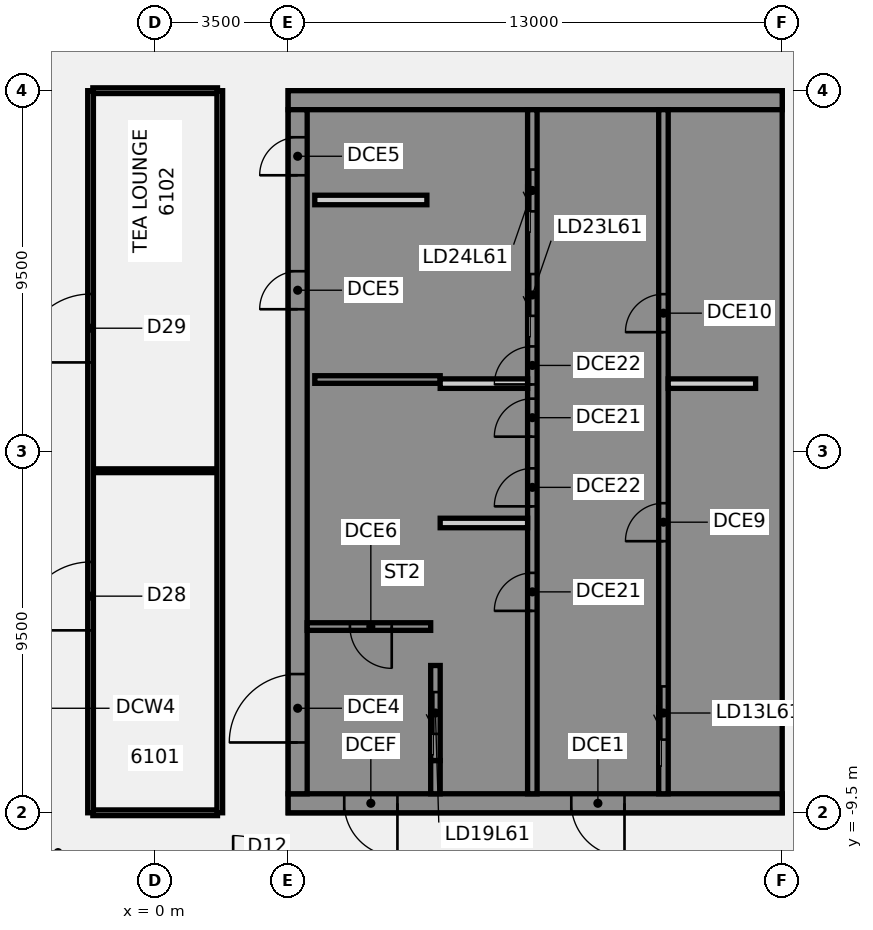
"""IFC4 building model, lengths in metres.
Left out: names, types, materials, properties, quantities, classifications, styles, units other than length and angle.
Written with IfcOpenShell. Run it as: python <this file> out.ifc"""

import sys

from ifc_helpers import new_model, si_unit, direction, frame, frame_2d, origin, place, context, subcontext, project, spatial, polyline, rectangle, outline, extrude, element, fill, save


model = new_model("IFC4")
c1 = context("Model", 3, precision=1e-05, world=origin(), true_north=direction((0.0, 1.0)))
c2 = subcontext(c1, "Body", "Model", "MODEL_VIEW")
j1 = project(units=[si_unit("LENGTHUNIT", "METRE"), si_unit("PLANEANGLEUNIT", "RADIAN")], contexts=[c1])
p1 = place(None, origin())
s1 = spatial("IfcSite", under=j1, at=p1, CompositionType="ELEMENT")
p2 = place(p1, origin())
s2 = spatial("IfcBuilding", under=s1, at=p2, CompositionType="ELEMENT")
p3 = place(p2, frame((0.0, 0.0, 241.5)))
s3 = spatial("IfcBuildingStorey", under=s2, at=p3, CompositionType="ELEMENT", Elevation=241.5)
p4 = place(p3, frame((-1.64, -9.5, 0.0), z_axis=(0.0, 0.0, 1.0), x_axis=(1.0, 0.0, 0.0)))
e1 = element("IfcWall", 1, at=p4, inside=s3, PredefinedType="PARTITIONING", context=c2, shape_type="SweptSolid", body=[
    extrude(rectangle(XDim=3.28, YDim=0.15, at=frame_2d((1.64, 0.0))), origin(), (0.0, 0.0, 1.0), 2.864),
])
p5 = place(p3, frame((-1.64, -0.5, 0.0), z_axis=(0.0, 0.0, 1.0), x_axis=(1.0, 0.0, 0.0)))
e2 = element("IfcWall", 2, at=p5, inside=s3, PredefinedType="PARTITIONING", context=c2, shape_type="SweptSolid", body=[
    extrude(rectangle(XDim=3.28, YDim=0.1, at=frame_2d((1.64, 0.0))), origin(), (0.0, 0.0, 1.0), 2.864),
])
p6 = place(p3, frame((-1.64, 9.5, 0.0), z_axis=(0.0, 0.0, 1.0), x_axis=(1.0, 0.0, 0.0)))
e3 = element("IfcWall", 3, at=p6, inside=s3, PredefinedType="PARTITIONING", context=c2, shape_type="SweptSolid", body=[
    extrude(rectangle(XDim=3.28, YDim=0.15, at=frame_2d((1.64, 0.0))), origin(), (0.0, 0.0, 1.0), 2.864),
])
p7 = place(p3, frame((-1.7, -9.5, 0.0), z_axis=(0.0, 0.0, 1.0), x_axis=(0.0, 1.0, 0.0)))
e4 = element("IfcWall", 4, at=p7, inside=s3, PredefinedType="PARTITIONING", context=c2, shape_type="SweptSolid", body=[
    extrude(rectangle(XDim=19.0, YDim=0.15, at=frame_2d((9.5, 0.0))), origin(), (0.0, 0.0, 1.0), 2.864),
])
p8 = place(p7, frame((4.8, 0.0, 0.0)))
e5 = element("IfcOpeningElement", 5, at=p8, cuts=e4, PredefinedType="OPENING", context=c2, shape_type="SweptSolid", body=[
    extrude(rectangle(XDim=1.8, YDim=2.1, at=frame_2d((0.9, 1.05))), frame((0.0, 0.085, 0.0), z_axis=(0.0, -1.0, 0.0), x_axis=(1.0, 0.0, 0.0)), (0.0, 0.0, 1.0), 0.17),
])
p9 = place(p7, frame((11.85, 0.0, 0.0)))
e6 = element("IfcOpeningElement", 6, at=p9, cuts=e4, PredefinedType="OPENING", context=c2, shape_type="SweptSolid", body=[
    extrude(rectangle(XDim=1.8, YDim=2.1, at=frame_2d((0.9, 1.05))), frame((0.0, 0.085, 0.0), z_axis=(0.0, -1.0, 0.0), x_axis=(1.0, 0.0, 0.0)), (0.0, 0.0, 1.0), 0.17),
])
p10 = place(p3, frame((1.7, -9.5, 0.0), z_axis=(0.0, 0.0, 1.0), x_axis=(0.0, 1.0, 0.0)))
e7 = element("IfcWall", 7, at=p10, inside=s3, PredefinedType="PARTITIONING", context=c2, shape_type="SweptSolid", body=[
    extrude(rectangle(XDim=19.0, YDim=0.15, at=frame_2d((9.5, 0.0))), origin(), (0.0, 0.0, 1.0), 2.864),
])
p11 = place(p3, frame((16.5, -9.25, 0.0), z_axis=(0.0, 0.0, 1.0), x_axis=(-1.0, 0.0, 0.0)))
e8 = element("IfcWall", 8, at=p11, inside=s3, PredefinedType="SHEAR", context=c2, shape_type="SweptSolid", body=[
    extrude(rectangle(XDim=13.0, YDim=0.5, at=frame_2d((6.5, 0.0))), origin(), (0.0, 0.0, 1.0), 3.46),
])
p12 = place(p11, frame((4.15, 0.0, 0.0)))
e9 = element("IfcOpeningElement", 9, at=p12, cuts=e8, PredefinedType="OPENING", context=c2, shape_type="SweptSolid", body=[
    extrude(rectangle(XDim=1.4, YDim=2.1, at=frame_2d((0.7, 1.05))), frame((0.0, 0.26, 0.0), z_axis=(0.0, -1.0, 0.0), x_axis=(1.0, 0.0, 0.0)), (0.0, 0.0, 1.0), 0.52),
])
p13 = place(p11, frame((10.125, 0.0, 0.0)))
e10 = element("IfcOpeningElement", 10, at=p13, cuts=e8, PredefinedType="OPENING", context=c2, shape_type="SweptSolid", body=[
    extrude(rectangle(XDim=1.4, YDim=2.1, at=frame_2d((0.7, 1.05))), frame((0.0, 0.26, 0.0), z_axis=(0.0, -1.0, 0.0), x_axis=(1.0, 0.0, 0.0)), (0.0, 0.0, 1.0), 0.52),
])
p14 = place(p3, origin())
e11 = element("IfcWall", 11, at=p14, inside=s3, PredefinedType="SHEAR", context=c2, shape_type="SweptSolid", body=[
    extrude(outline(polyline([(13.5, -8.125), (13.5, -9.0), (16.0, -9.0), (16.5, -9.0), (16.5, 9.0), (16.0, 9.0), (13.5, 9.0), (13.5, 8.125), (16.0, 8.125), (16.0, 5.625), (13.5, 5.625), (13.5, 5.375), (16.0, 5.375), (16.0, -5.375), (13.5, -5.375), (13.5, -5.625), (16.0, -5.625), (16.0, -8.125), (13.5, -8.125)])), origin(), (0.0, 0.0, 1.0), 3.46),
])
p15 = place(p3, frame((16.5, 9.25, 0.0), z_axis=(0.0, 0.0, 1.0), x_axis=(-1.0, 0.0, 0.0)))
e12 = element("IfcWall", 12, at=p15, inside=s3, PredefinedType="SHEAR", context=c2, shape_type="SweptSolid", body=[
    extrude(rectangle(XDim=13.0, YDim=0.5, at=frame_2d((6.5, 0.0))), origin(), (0.0, 0.0, 1.0), 3.46),
])
p16 = place(p3, origin())
e13 = element("IfcWall", 13, at=p16, inside=s3, PredefinedType="SHEAR", context=c2, shape_type="SweptSolid", body=[
    extrude(outline(polyline([(9.8, -5.375), (7.5, -5.375), (7.5, 2.625), (9.8, 2.625), (9.8, 2.875), (7.5, 2.875), (7.5, 5.375), (9.8, 5.375), (9.8, 5.625), (7.5, 5.625), (7.5, 8.125), (9.8, 8.125), (9.8, 9.0), (7.5, 9.0), (7.25, 9.0), (7.25, -5.625), (7.5, -5.625), (9.8, -5.625), (9.8, -5.375)])), origin(), (0.0, 0.0, 1.0), 3.46),
])
p17 = place(p3, origin())
e14 = element("IfcWall", 14, at=p17, inside=s3, PredefinedType="SHEAR", context=c2, shape_type="SweptSolid", body=[
    extrude(outline(polyline([(7.5, -8.125), (7.5, -9.0), (9.8, -9.0), (9.8, -8.125), (9.8, -5.625), (9.55, -5.625), (9.55, -8.125), (7.5, -8.125)])), origin(), (0.0, 0.0, 1.0), 3.46),
])
p18 = place(p3, frame((7.375, -9.0, 0.0), z_axis=(0.0, 0.0, 1.0), x_axis=(0.0, 1.0, 0.0)))
e15 = element("IfcWall", 15, at=p18, inside=s3, PredefinedType="SHEAR", context=c2, shape_type="SweptSolid", body=[
    extrude(rectangle(XDim=0.875, YDim=0.25, at=frame_2d((0.438, 0.0))), origin(), (0.0, 0.0, 1.0), 3.46),
])
p19 = place(p3, frame((7.5, 1.9, 0.0), z_axis=(0.0, 0.0, 1.0), x_axis=(-1.0, 0.0, 0.0)))
e16 = element("IfcWall", 16, at=p19, inside=s3, PredefinedType="SHEAR", context=c2, shape_type="SweptSolid", body=[
    extrude(rectangle(XDim=3.3, YDim=0.2, at=frame_2d((1.65, 0.0))), origin(), (0.0, 0.0, 1.0), 3.46),
])
p20 = place(p3, frame((13.375, -9.0, 0.0), z_axis=(0.0, 0.0, 1.0), x_axis=(0.0, 1.0, 0.0)))
e17 = element("IfcWall", 17, at=p20, inside=s3, PredefinedType="SHEAR", context=c2, shape_type="SweptSolid", body=[
    extrude(rectangle(XDim=18.0, YDim=0.25, at=frame_2d((9.0, 0.0))), origin(), (0.0, 0.0, 1.0), 3.46),
])
p21 = place(p20, frame((1.425, 0.0, 0.0)))
e18 = element("IfcOpeningElement", 18, at=p21, cuts=e17, PredefinedType="OPENING", context=c2, shape_type="SweptSolid", body=[
    extrude(rectangle(XDim=1.4, YDim=2.1, at=frame_2d((0.7, 1.05))), frame((0.0, 0.135, 0.0), z_axis=(0.0, -1.0, 0.0), x_axis=(1.0, 0.0, 0.0)), (0.0, 0.0, 1.0), 0.27),
])
p22 = place(p20, frame((6.646, 0.0, 0.0)))
e19 = element("IfcOpeningElement", 19, at=p22, cuts=e17, PredefinedType="OPENING", context=c2, shape_type="SweptSolid", body=[
    extrude(rectangle(XDim=1.0, YDim=2.1, at=frame_2d((0.5, 1.05))), frame((0.0, 0.135, 0.0), z_axis=(0.0, -1.0, 0.0), x_axis=(1.0, 0.0, 0.0)), (0.0, 0.0, 1.0), 0.27),
])
p23 = place(p20, frame((12.146, 0.0, 0.0)))
e20 = element("IfcOpeningElement", 20, at=p23, cuts=e17, PredefinedType="OPENING", context=c2, shape_type="SweptSolid", body=[
    extrude(rectangle(XDim=1.0, YDim=2.1, at=frame_2d((0.5, 1.05))), frame((0.0, 0.135, 0.0), z_axis=(0.0, -1.0, 0.0), x_axis=(1.0, 0.0, 0.0)), (0.0, 0.0, 1.0), 0.27),
])
p24 = place(p3, frame((9.925, -9.0, 0.0), z_axis=(0.0, 0.0, 1.0), x_axis=(0.0, 1.0, 0.0)))
e21 = element("IfcWall", 21, at=p24, inside=s3, PredefinedType="SHEAR", context=c2, shape_type="SweptSolid", body=[
    extrude(rectangle(XDim=18.0, YDim=0.25, at=frame_2d((9.0, 0.0))), origin(), (0.0, 0.0, 1.0), 3.46),
])
p25 = place(p24, frame((12.575, 0.0, 0.0)))
e22 = element("IfcOpeningElement", 22, at=p25, cuts=e21, PredefinedType="OPENING", context=c2, shape_type="SweptSolid", body=[
    extrude(rectangle(XDim=1.1, YDim=2.1, at=frame_2d((0.55, 1.05))), frame((0.0, 0.135, 0.0), z_axis=(0.0, -1.0, 0.0), x_axis=(1.0, 0.0, 0.0)), (0.0, 0.0, 1.0), 0.27),
])
p26 = place(p24, frame((15.325, 0.0, 0.0)))
e23 = element("IfcOpeningElement", 23, at=p26, cuts=e21, PredefinedType="OPENING", context=c2, shape_type="SweptSolid", body=[
    extrude(rectangle(XDim=1.1, YDim=2.1, at=frame_2d((0.55, 1.05))), frame((0.0, 0.135, 0.0), z_axis=(0.0, -1.0, 0.0), x_axis=(1.0, 0.0, 0.0)), (0.0, 0.0, 1.0), 0.27),
])
p27 = place(p24, frame((4.812, 0.0, 0.0)))
e24 = element("IfcOpeningElement", 24, at=p27, cuts=e21, PredefinedType="OPENING", context=c2, shape_type="SweptSolid", body=[
    extrude(rectangle(XDim=1.0, YDim=2.1, at=frame_2d((0.5, 1.05))), frame((0.0, 0.135, 0.0), z_axis=(0.0, -1.0, 0.0), x_axis=(1.0, 0.0, 0.0)), (0.0, 0.0, 1.0), 0.27),
])
p28 = place(p24, frame((7.562, 0.0, 0.0)))
e25 = element("IfcOpeningElement", 25, at=p28, cuts=e21, PredefinedType="OPENING", context=c2, shape_type="SweptSolid", body=[
    extrude(rectangle(XDim=1.0, YDim=2.1, at=frame_2d((0.5, 1.05))), frame((0.0, 0.135, 0.0), z_axis=(0.0, -1.0, 0.0), x_axis=(1.0, 0.0, 0.0)), (0.0, 0.0, 1.0), 0.27),
])
p29 = place(p24, frame((9.396, 0.0, 0.0)))
e26 = element("IfcOpeningElement", 26, at=p29, cuts=e21, PredefinedType="OPENING", context=c2, shape_type="SweptSolid", body=[
    extrude(rectangle(XDim=1.0, YDim=2.1, at=frame_2d((0.5, 1.05))), frame((0.0, 0.135, 0.0), z_axis=(0.0, -1.0, 0.0), x_axis=(1.0, 0.0, 0.0)), (0.0, 0.0, 1.0), 0.27),
])
p30 = place(p24, frame((10.771, 0.0, 0.0)))
e27 = element("IfcOpeningElement", 27, at=p30, cuts=e21, PredefinedType="OPENING", context=c2, shape_type="SweptSolid", body=[
    extrude(rectangle(XDim=1.0, YDim=2.1, at=frame_2d((0.5, 1.05))), frame((0.0, 0.135, 0.0), z_axis=(0.0, -1.0, 0.0), x_axis=(1.0, 0.0, 0.0)), (0.0, 0.0, 1.0), 0.27),
])
p31 = place(p3, frame((7.375, -8.125, 0.0), z_axis=(0.0, 0.0, 1.0), x_axis=(0.0, 1.0, 0.0)))
e28 = element("IfcWall", 28, at=p31, inside=s3, PredefinedType="SHEAR", context=c2, shape_type="SweptSolid", body=[
    extrude(rectangle(XDim=2.5, YDim=0.25, at=frame_2d((1.25, 0.0))), origin(), (0.0, 0.0, 1.0), 3.46),
])
p32 = place(p31, frame((0.7, 0.0, 0.0)))
e29 = element("IfcOpeningElement", 29, at=p32, cuts=e28, PredefinedType="OPENING", context=c2, shape_type="SweptSolid", body=[
    extrude(rectangle(XDim=1.1, YDim=2.1, at=frame_2d((0.55, 1.05))), frame((0.0, 0.135, 0.0), z_axis=(0.0, -1.0, 0.0), x_axis=(1.0, 0.0, 0.0)), (0.0, 0.0, 1.0), 0.27),
])
p33 = place(p3, frame((3.75, -9.0, 0.0), z_axis=(0.0, 0.0, 1.0), x_axis=(0.0, 1.0, 0.0)))
e30 = element("IfcWall", 30, at=p33, inside=s3, PredefinedType="SHEAR", context=c2, shape_type="SweptSolid", body=[
    extrude(rectangle(XDim=18.0, YDim=0.5, at=frame_2d((9.0, 0.0))), origin(), (0.0, 0.0, 1.0), 3.46),
])
p34 = place(p33, frame((1.35, 0.0, 0.0)))
e31 = element("IfcOpeningElement", 31, at=p34, cuts=e30, PredefinedType="OPENING", context=c2, shape_type="SweptSolid", body=[
    extrude(rectangle(XDim=1.8, YDim=2.1, at=frame_2d((0.9, 1.05))), frame((0.0, 0.26, 0.0), z_axis=(0.0, -1.0, 0.0), x_axis=(1.0, 0.0, 0.0)), (0.0, 0.0, 1.0), 0.52),
])
p35 = place(p33, frame((12.75, 0.0, 0.0)))
e32 = element("IfcOpeningElement", 32, at=p35, cuts=e30, PredefinedType="OPENING", context=c2, shape_type="SweptSolid", body=[
    extrude(rectangle(XDim=1.0, YDim=2.1, at=frame_2d((0.5, 1.05))), frame((0.0, 0.26, 0.0), z_axis=(0.0, -1.0, 0.0), x_axis=(1.0, 0.0, 0.0)), (0.0, 0.0, 1.0), 0.52),
])
p36 = place(p33, frame((16.274, 0.0, 0.0)))
e33 = element("IfcOpeningElement", 33, at=p36, cuts=e30, PredefinedType="OPENING", context=c2, shape_type="SweptSolid", body=[
    extrude(rectangle(XDim=1.0, YDim=2.1, at=frame_2d((0.5, 1.05))), frame((0.0, 0.26, 0.0), z_axis=(0.0, -1.0, 0.0), x_axis=(1.0, 0.0, 0.0)), (0.0, 0.0, 1.0), 0.52),
])
p37 = place(p3, frame((7.15, 6.624, 0.0), z_axis=(0.0, 0.0, 1.0), x_axis=(-1.0, 0.0, 0.0)))
e34 = element("IfcWall", 34, at=p37, inside=s3, PredefinedType="PARTITIONING", context=c2, shape_type="SweptSolid", body=[
    extrude(rectangle(XDim=2.95, YDim=0.25, at=frame_2d((1.475, 0.0))), origin(), (0.0, 0.0, 1.0), 3.46),
])
p38 = place(p3, frame((7.25, -4.6, 0.0), z_axis=(0.0, 0.0, 1.0), x_axis=(-1.0, 0.0, 0.0)))
e35 = element("IfcWall", 35, at=p38, inside=s3, PredefinedType="SHEAR", context=c2, shape_type="SweptSolid", body=[
    extrude(rectangle(XDim=3.25, YDim=0.2, at=frame_2d((1.625, 0.0))), origin(), (0.0, 0.0, 1.0), 3.46),
])
p39 = place(p38, frame((1.025, 0.0, 0.0)))
e36 = element("IfcOpeningElement", 36, at=p39, cuts=e35, PredefinedType="OPENING", context=c2, shape_type="SweptSolid", body=[
    extrude(rectangle(XDim=1.1, YDim=2.1, at=frame_2d((0.55, 1.05))), frame((0.0, 0.11, 0.0), z_axis=(0.0, -1.0, 0.0), x_axis=(1.0, 0.0, 0.0)), (0.0, 0.0, 1.0), 0.22),
])
for number, where, z_axis, x_axis in (
    (37, (15.8, 1.792, 0.0), (0.0, 0.0, 1.0), (-1.0, 0.0, 0.0)),
    (38, (9.8, -1.875, 0.0), (0.0, 0.0, 1.0), (-1.0, 0.0, 0.0)),
    (39, (9.8, 1.792, 0.0), (0.0, 0.0, 1.0), (-1.0, 0.0, 0.0)),
):
    element("IfcWall", number, at=place(p3, frame(where, z_axis=z_axis, x_axis=x_axis)), inside=s3, PredefinedType="PARTITIONING", context=c2, shape_type="SweptSolid", body=[
        extrude(rectangle(XDim=2.3, YDim=0.25, at=frame_2d((1.15, 0.0))), origin(), (0.0, 0.0, 1.0), 3.46),
    ])
p40 = place(p8, frame((1.8, 0.0, 0.0), z_axis=(0.0, 0.0, 1.0), x_axis=(-1.0, 0.0, 0.0)))
e40 = element("IfcDoor", 40, at=p40, inside=s3, OperationType="DOUBLE_DOOR_SINGLE_SWING", PredefinedType="DOOR", context=c2, shape_type="SweptSolid", body=[
    extrude(rectangle(XDim=1.8, YDim=2.1, at=frame_2d((0.9, 1.05))), frame((0.0, 0.025, 0.0), z_axis=(0.0, -1.0, 0.0), x_axis=(1.0, 0.0, 0.0)), (0.0, 0.0, 1.0), 0.05),
])
fill(e5, e40)
p41 = place(p9, frame((1.8, 0.0, 0.0), z_axis=(0.0, 0.0, 1.0), x_axis=(-1.0, 0.0, 0.0)))
e41 = element("IfcDoor", 41, at=p41, inside=s3, OperationType="DOUBLE_DOOR_SINGLE_SWING", PredefinedType="DOOR", context=c2, shape_type="SweptSolid", body=[
    extrude(rectangle(XDim=1.8, YDim=2.1, at=frame_2d((0.9, 1.05))), frame((0.0, 0.025, 0.0), z_axis=(0.0, -1.0, 0.0), x_axis=(1.0, 0.0, 0.0)), (0.0, 0.0, 1.0), 0.05),
])
fill(e6, e41)
p42 = place(p12, origin())
e42 = element("IfcDoor", 42, at=p42, inside=s3, OperationType="SINGLE_SWING_LEFT", PredefinedType="DOOR", context=c2, shape_type="SweptSolid", body=[
    extrude(rectangle(XDim=1.4, YDim=2.1, at=frame_2d((0.7, 1.05))), frame((0.0, 0.025, 0.0), z_axis=(0.0, -1.0, 0.0), x_axis=(1.0, 0.0, 0.0)), (0.0, 0.0, 1.0), 0.05),
])
fill(e9, e42)
p43 = place(p13, origin())
e43 = element("IfcDoor", 43, at=p43, inside=s3, OperationType="SINGLE_SWING_LEFT", PredefinedType="DOOR", context=c2, shape_type="SweptSolid", body=[
    extrude(rectangle(XDim=1.4, YDim=2.1, at=frame_2d((0.7, 1.05))), frame((0.0, 0.025, 0.0), z_axis=(0.0, -1.0, 0.0), x_axis=(1.0, 0.0, 0.0)), (0.0, 0.0, 1.0), 0.05),
])
fill(e10, e43)
p44 = place(p34, origin())
e44 = element("IfcDoor", 44, at=p44, inside=s3, OperationType="SINGLE_SWING_LEFT", PredefinedType="DOOR", context=c2, shape_type="SweptSolid", body=[
    extrude(rectangle(XDim=1.8, YDim=2.1, at=frame_2d((0.9, 1.05))), frame((0.0, 0.025, 0.0), z_axis=(0.0, -1.0, 0.0), x_axis=(1.0, 0.0, 0.0)), (0.0, 0.0, 1.0), 0.05),
])
fill(e31, e44)
p45 = place(p35, origin())
e45 = element("IfcDoor", 45, at=p45, inside=s3, OperationType="SINGLE_SWING_LEFT", PredefinedType="DOOR", context=c2, shape_type="SweptSolid", body=[
    extrude(rectangle(XDim=1.0, YDim=2.1, at=frame_2d((0.5, 1.05))), frame((0.0, -0.175, 0.0), z_axis=(0.0, -1.0, 0.0), x_axis=(1.0, 0.0, 0.0)), (0.0, 0.0, 1.0), 0.05),
])
fill(e32, e45)
p46 = place(p36, origin())
e46 = element("IfcDoor", 46, at=p46, inside=s3, OperationType="SINGLE_SWING_LEFT", PredefinedType="DOOR", context=c2, shape_type="SweptSolid", body=[
    extrude(rectangle(XDim=1.0, YDim=2.1, at=frame_2d((0.5, 1.05))), frame((0.0, -0.175, 0.0), z_axis=(0.0, -1.0, 0.0), x_axis=(1.0, 0.0, 0.0)), (0.0, 0.0, 1.0), 0.05),
])
fill(e33, e46)
p47 = place(p39, origin())
e47 = element("IfcDoor", 47, at=p47, inside=s3, OperationType="SINGLE_SWING_LEFT", PredefinedType="DOOR", context=c2, shape_type="SweptSolid", body=[
    extrude(rectangle(XDim=1.1, YDim=2.1, at=frame_2d((0.55, 1.05))), frame((0.0, 0.025, 0.0), z_axis=(0.0, -1.0, 0.0), x_axis=(1.0, 0.0, 0.0)), (0.0, 0.0, 1.0), 0.05),
])
fill(e36, e47)
p48 = place(p21, origin())
e48 = element("IfcDoor", 48, at=p48, inside=s3, OperationType="SLIDING_TO_LEFT", PredefinedType="DOOR", context=c2, shape_type="SweptSolid", body=[
    extrude(rectangle(XDim=1.4, YDim=2.1, at=frame_2d((0.7, 1.05))), frame((0.0, 0.025, 0.0), z_axis=(0.0, -1.0, 0.0), x_axis=(1.0, 0.0, 0.0)), (0.0, 0.0, 1.0), 0.05),
])
fill(e18, e48)
p49 = place(p32, origin())
e49 = element("IfcDoor", 49, at=p49, inside=s3, OperationType="SLIDING_TO_LEFT", PredefinedType="DOOR", context=c2, shape_type="SweptSolid", body=[
    extrude(rectangle(XDim=1.1, YDim=2.1, at=frame_2d((0.55, 1.05))), frame((0.0, 0.025, 0.0), z_axis=(0.0, -1.0, 0.0), x_axis=(1.0, 0.0, 0.0)), (0.0, 0.0, 1.0), 0.05),
])
fill(e29, e49)
p50 = place(p25, origin())
e50 = element("IfcDoor", 50, at=p50, inside=s3, OperationType="SLIDING_TO_LEFT", PredefinedType="DOOR", context=c2, shape_type="SweptSolid", body=[
    extrude(rectangle(XDim=1.1, YDim=2.1, at=frame_2d((0.55, 1.05))), frame((0.0, 0.025, 0.0), z_axis=(0.0, -1.0, 0.0), x_axis=(1.0, 0.0, 0.0)), (0.0, 0.0, 1.0), 0.05),
])
fill(e22, e50)
p51 = place(p26, origin())
e51 = element("IfcDoor", 51, at=p51, inside=s3, OperationType="SLIDING_TO_LEFT", PredefinedType="DOOR", context=c2, shape_type="SweptSolid", body=[
    extrude(rectangle(XDim=1.1, YDim=2.1, at=frame_2d((0.55, 1.05))), frame((0.0, 0.025, 0.0), z_axis=(0.0, -1.0, 0.0), x_axis=(1.0, 0.0, 0.0)), (0.0, 0.0, 1.0), 0.05),
])
fill(e23, e51)
p52 = place(p22, origin())
e52 = element("IfcDoor", 52, at=p52, inside=s3, OperationType="SINGLE_SWING_LEFT", PredefinedType="DOOR", context=c2, shape_type="SweptSolid", body=[
    extrude(rectangle(XDim=1.0, YDim=2.1, at=frame_2d((0.5, 1.05))), frame((0.0, 0.025, 0.0), z_axis=(0.0, -1.0, 0.0), x_axis=(1.0, 0.0, 0.0)), (0.0, 0.0, 1.0), 0.05),
])
fill(e19, e52)
p53 = place(p23, origin())
e53 = element("IfcDoor", 53, at=p53, inside=s3, OperationType="SINGLE_SWING_LEFT", PredefinedType="DOOR", context=c2, shape_type="SweptSolid", body=[
    extrude(rectangle(XDim=1.0, YDim=2.1, at=frame_2d((0.5, 1.05))), frame((0.0, 0.025, 0.0), z_axis=(0.0, -1.0, 0.0), x_axis=(1.0, 0.0, 0.0)), (0.0, 0.0, 1.0), 0.05),
])
fill(e20, e53)
p54 = place(p27, origin())
e54 = element("IfcDoor", 54, at=p54, inside=s3, OperationType="SINGLE_SWING_LEFT", PredefinedType="DOOR", context=c2, shape_type="SweptSolid", body=[
    extrude(rectangle(XDim=1.0, YDim=2.1, at=frame_2d((0.5, 1.05))), frame((0.0, 0.025, 0.0), z_axis=(0.0, -1.0, 0.0), x_axis=(1.0, 0.0, 0.0)), (0.0, 0.0, 1.0), 0.05),
])
fill(e24, e54)
p55 = place(p28, origin())
e55 = element("IfcDoor", 55, at=p55, inside=s3, OperationType="SINGLE_SWING_LEFT", PredefinedType="DOOR", context=c2, shape_type="SweptSolid", body=[
    extrude(rectangle(XDim=1.0, YDim=2.1, at=frame_2d((0.5, 1.05))), frame((0.0, 0.025, 0.0), z_axis=(0.0, -1.0, 0.0), x_axis=(1.0, 0.0, 0.0)), (0.0, 0.0, 1.0), 0.05),
])
fill(e25, e55)
p56 = place(p29, origin())
e56 = element("IfcDoor", 56, at=p56, inside=s3, OperationType="SINGLE_SWING_LEFT", PredefinedType="DOOR", context=c2, shape_type="SweptSolid", body=[
    extrude(rectangle(XDim=1.0, YDim=2.1, at=frame_2d((0.5, 1.05))), frame((0.0, 0.025, 0.0), z_axis=(0.0, -1.0, 0.0), x_axis=(1.0, 0.0, 0.0)), (0.0, 0.0, 1.0), 0.05),
])
fill(e26, e56)
p57 = place(p30, origin())
e57 = element("IfcDoor", 57, at=p57, inside=s3, OperationType="SINGLE_SWING_LEFT", PredefinedType="DOOR", context=c2, shape_type="SweptSolid", body=[
    extrude(rectangle(XDim=1.0, YDim=2.1, at=frame_2d((0.5, 1.05))), frame((0.0, 0.025, 0.0), z_axis=(0.0, -1.0, 0.0), x_axis=(1.0, 0.0, 0.0)), (0.0, 0.0, 1.0), 0.05),
])
fill(e27, e57)
save(model, sys.argv[1])
